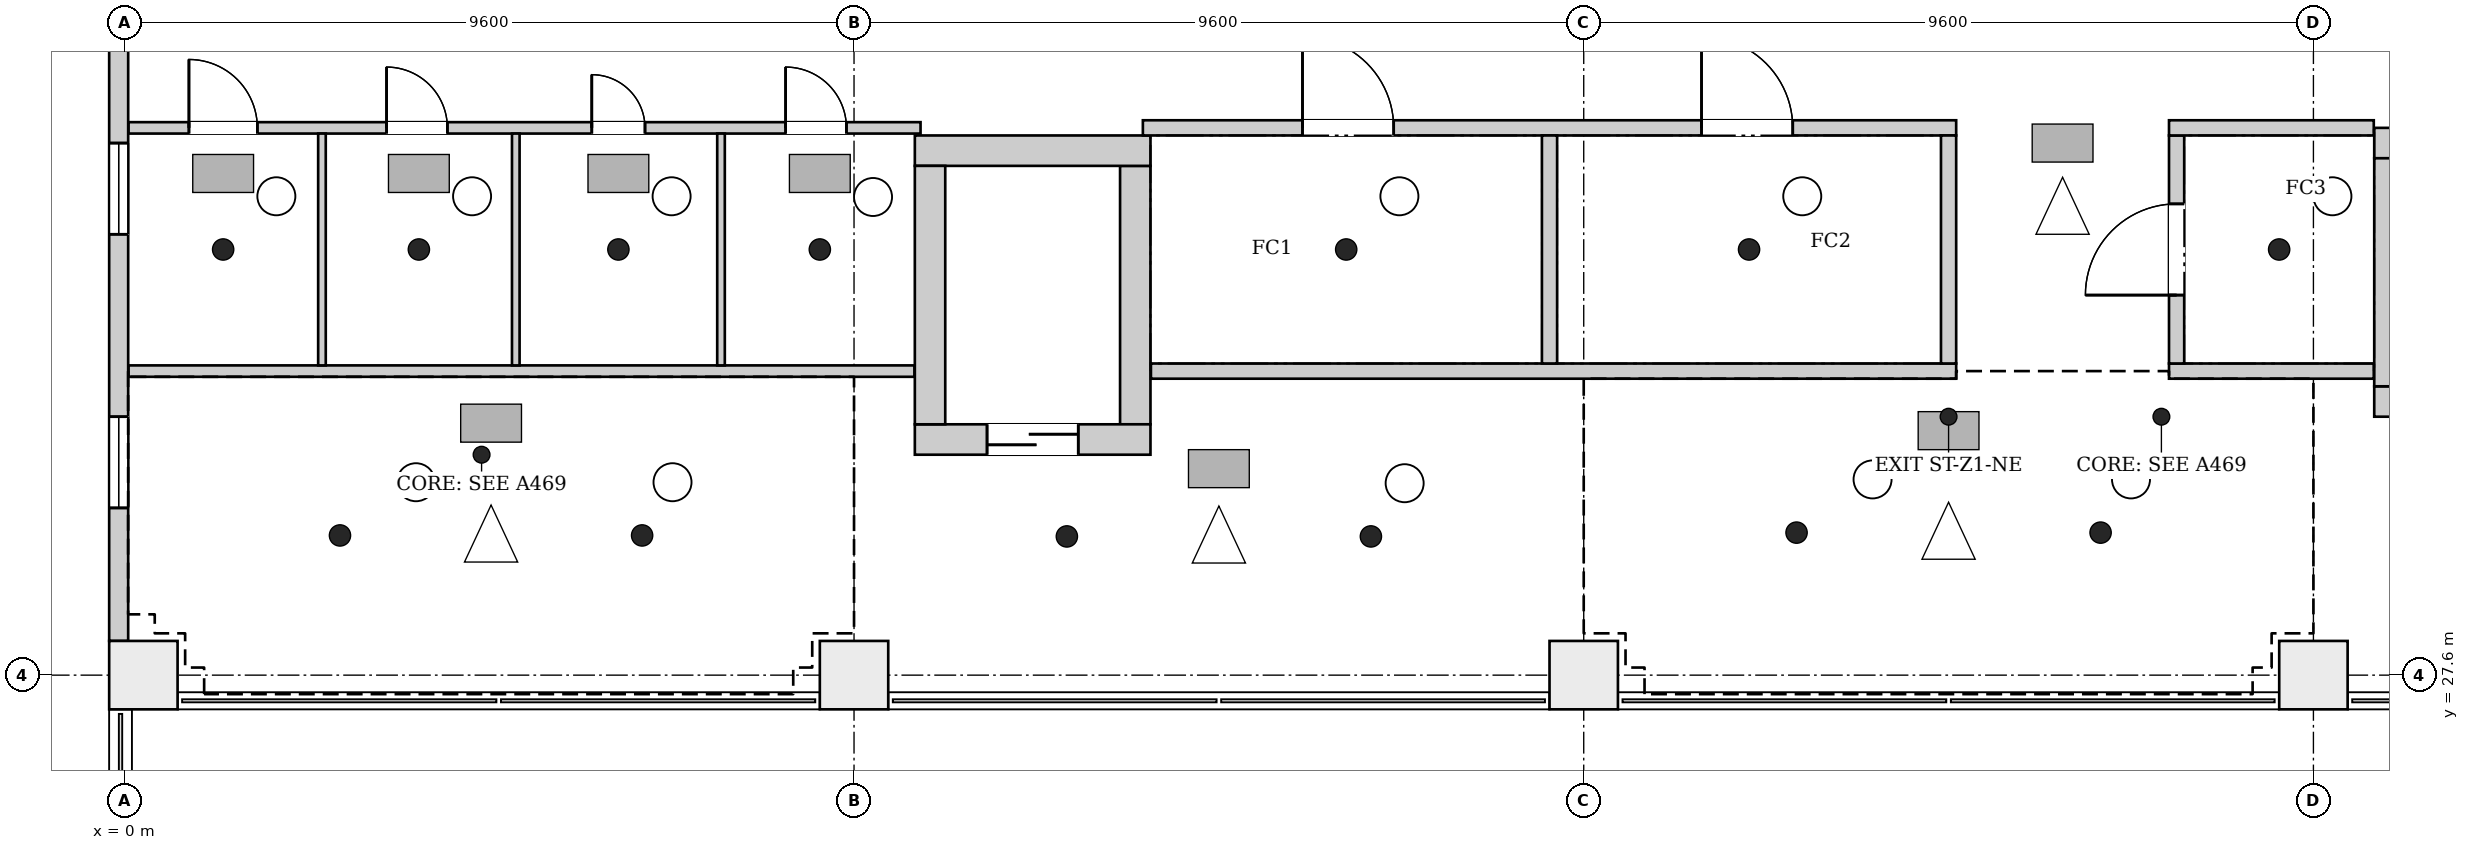
"""IFC4 building model, lengths in metres.
Left out: names, types, materials, properties, quantities, classifications, styles, units other than length and angle.
Written with IfcOpenShell. Run it as: python <this file> out.ifc"""

import sys

from ifc_helpers import new_model, si_unit, direction, frame, frame_2d, origin, origin_2d, place, context, subcontext, project, spatial, rectangle, extrude, element, fill, save


model = new_model("IFC4")
c1 = context("Model", 3, precision=1e-05, world=origin(), true_north=direction((0.0, 1.0)))
c2 = subcontext(c1, "Body", "Model", "MODEL_VIEW")
j1 = project(units=[si_unit("LENGTHUNIT", "METRE"), si_unit("PLANEANGLEUNIT", "RADIAN")], contexts=[c1])
p1 = place(None, origin())
s1 = spatial("IfcSite", under=j1, at=p1, CompositionType="ELEMENT")
p2 = place(p1, origin())
s2 = spatial("IfcBuilding", under=s1, at=p2, CompositionType="ELEMENT")
p3 = place(p2, frame((0.0, 0.0, 36.1)))
s3 = spatial("IfcBuildingStorey", under=s2, at=p3, CompositionType="ELEMENT", Elevation=36.1)
p4 = place(p3, frame((10.4, 30.7, 0.0), z_axis=(0.0, 0.0, 1.0), x_axis=(1.0, 0.0, 0.0)))
e1 = element("IfcWall", 1, at=p4, inside=s3, PredefinedType="SHEAR", context=c2, shape_type="SweptSolid", body=[
    extrude(rectangle(XDim=3.1, YDim=0.4, at=frame_2d((1.55, 0.0))), origin(), (0.0, 0.0, 1.0), 4.2),
])
p5 = place(p4, frame((0.95, 0.0, 0.0)))
e2 = element("IfcOpeningElement", 2, at=p5, cuts=e1, PredefinedType="OPENING", context=c2, shape_type="SweptSolid", body=[
    extrude(rectangle(XDim=1.2, YDim=2.1, at=frame_2d((0.6, 1.05))), frame((0.0, 0.21, 0.0), z_axis=(0.0, -1.0, 0.0), x_axis=(1.0, 0.0, 0.0)), (0.0, 0.0, 1.0), 0.42),
])
p6 = place(p3, frame((10.4, 34.5, 0.0), z_axis=(0.0, 0.0, 1.0), x_axis=(1.0, 0.0, 0.0)))
e3 = element("IfcWall", 3, at=p6, inside=s3, PredefinedType="SHEAR", context=c2, shape_type="SweptSolid", body=[
    extrude(rectangle(XDim=3.1, YDim=0.4, at=frame_2d((1.55, 0.0))), origin(), (0.0, 0.0, 1.0), 4.2),
])
for number, where, z_axis, x_axis in (
    (4, (10.6, 30.9, 0.0), (0.0, 0.0, 1.0), (0.0, 1.0, 0.0)),
    (5, (13.3, 30.9, 0.0), (0.0, 0.0, 1.0), (0.0, 1.0, 0.0)),
):
    element("IfcWall", number, at=place(p3, frame(where, z_axis=z_axis, x_axis=x_axis)), inside=s3, PredefinedType="SHEAR", context=c2, shape_type="SweptSolid", body=[
        extrude(rectangle(XDim=3.4, YDim=0.4, at=frame_2d((1.7, 0.0))), origin(), (0.0, 0.0, 1.0), 4.2),
    ])
p7 = place(p3, frame((29.6, 31.2, 0.0), z_axis=(0.0, 0.0, 1.0), x_axis=(1.0, 0.0, 0.0)))
e6 = element("IfcWall", 6, at=p7, inside=s3, PredefinedType="SHEAR", context=c2, shape_type="SweptSolid", body=[
    extrude(rectangle(XDim=2.9, YDim=0.4, at=frame_2d((1.45, 0.0))), origin(), (0.0, 0.0, 1.0), 4.2),
])
p8 = place(p7, frame((0.9, 0.0, 0.0)))
e7 = element("IfcOpeningElement", 7, at=p8, cuts=e6, PredefinedType="OPENING", context=c2, shape_type="SweptSolid", body=[
    extrude(rectangle(XDim=1.1, YDim=2.1, at=frame_2d((0.55, 1.05))), frame((0.0, 0.21, 0.0), z_axis=(0.0, -1.0, 0.0), x_axis=(1.0, 0.0, 0.0)), (0.0, 0.0, 1.0), 0.42),
])
p9 = place(p3, frame((29.6, 34.6, 0.0), z_axis=(0.0, 0.0, 1.0), x_axis=(1.0, 0.0, 0.0)))
e8 = element("IfcWall", 8, at=p9, inside=s3, PredefinedType="SHEAR", context=c2, shape_type="SweptSolid", body=[
    extrude(rectangle(XDim=2.9, YDim=0.4, at=frame_2d((1.45, 0.0))), origin(), (0.0, 0.0, 1.0), 4.2),
])
p10 = place(p3, frame((29.8, 31.4, 0.0), z_axis=(0.0, 0.0, 1.0), x_axis=(0.0, 1.0, 0.0)))
e9 = element("IfcWall", 9, at=p10, inside=s3, PredefinedType="SHEAR", context=c2, shape_type="SweptSolid", body=[
    extrude(rectangle(XDim=3.0, YDim=0.4, at=frame_2d((1.5, 0.0))), origin(), (0.0, 0.0, 1.0), 4.2),
])
for number, where, z_axis, x_axis in (
    (10, (0.25, 27.6, 0.0), (0.0, 0.0, 1.0), (1.0, 0.0, 0.0)),
    (11, (9.6, 27.6, 0.0), (0.0, 0.0, 1.0), (1.0, 0.0, 0.0)),
    (12, (19.2, 27.6, 0.0), (0.0, 0.0, 1.0), (1.0, 0.0, 0.0)),
    (13, (28.8, 27.6, 0.0), (0.0, 0.0, 1.0), (1.0, 0.0, 0.0)),
):
    element("IfcColumn", number, at=place(p3, frame(where, z_axis=z_axis, x_axis=x_axis)), inside=s3, PredefinedType="COLUMN", context=c2, shape_type="SweptSolid", body=[
        extrude(rectangle(XDim=0.9, YDim=0.9, at=origin_2d()), origin(), (0.0, 0.0, 1.0), 4.2),
    ])
p11 = place(p3, frame((-0.074, 36.35, 0.0), z_axis=(0.0, 0.0, 1.0), x_axis=(0.0, -1.0, 0.0)))
e14 = element("IfcWall", 14, at=p11, inside=s3, PredefinedType="ELEMENTEDWALL", context=c2, shape_type="SweptSolid", body=[
    extrude(rectangle(XDim=8.3, YDim=0.25, at=frame_2d((4.15, 0.0))), origin(), (0.0, 0.0, 1.0), 3.9),
])
p12 = place(p11, frame((5.35, 0.0, 0.9)))
e15 = element("IfcOpeningElement", 15, at=p12, cuts=e14, PredefinedType="OPENING", context=c2, shape_type="SweptSolid", body=[
    extrude(rectangle(XDim=1.2, YDim=2.6, at=frame_2d((0.6, 1.3))), frame((0.0, 0.135, 0.0), z_axis=(0.0, -1.0, 0.0), x_axis=(1.0, 0.0, 0.0)), (0.0, 0.0, 1.0), 0.27),
])
p13 = place(p11, frame((1.75, 0.0, 0.9)))
e16 = element("IfcOpeningElement", 16, at=p13, cuts=e14, PredefinedType="OPENING", context=c2, shape_type="SweptSolid", body=[
    extrude(rectangle(XDim=1.2, YDim=2.6, at=frame_2d((0.6, 1.3))), frame((0.0, 0.135, 0.0), z_axis=(0.0, -1.0, 0.0), x_axis=(1.0, 0.0, 0.0)), (0.0, 0.0, 1.0), 0.27),
])
p14 = place(p3, frame((0.056, 31.6, 0.0), z_axis=(0.0, 0.0, 1.0), x_axis=(1.0, 0.0, 0.0)))
e17 = element("IfcWall", 17, at=p14, inside=s3, PredefinedType="PARTITIONING", context=c2, shape_type="SweptSolid", body=[
    extrude(rectangle(XDim=10.338, YDim=0.15, at=frame_2d((5.169, 0.0))), origin(), (0.0, 0.0, 1.0), 3.9),
])
p15 = place(p3, frame((0.056, 34.8, 0.0), z_axis=(0.0, 0.0, 1.0), x_axis=(1.0, 0.0, 0.0)))
e18 = element("IfcWall", 18, at=p15, inside=s3, PredefinedType="PARTITIONING", context=c2, shape_type="SweptSolid", body=[
    extrude(rectangle(XDim=10.419, YDim=0.15, at=frame_2d((5.209, 0.0))), origin(), (0.0, 0.0, 1.0), 3.9),
])
p16 = place(p15, frame((0.794, 0.0, 0.0)))
e19 = element("IfcOpeningElement", 19, at=p16, cuts=e18, PredefinedType="OPENING", context=c2, shape_type="SweptSolid", body=[
    extrude(rectangle(XDim=0.9, YDim=2.1, at=frame_2d((0.45, 1.05))), frame((0.0, 0.085, 0.0), z_axis=(0.0, -1.0, 0.0), x_axis=(1.0, 0.0, 0.0)), (0.0, 0.0, 1.0), 0.17),
])
p17 = place(p15, frame((3.394, 0.0, 0.0)))
e20 = element("IfcOpeningElement", 20, at=p17, cuts=e18, PredefinedType="OPENING", context=c2, shape_type="SweptSolid", body=[
    extrude(rectangle(XDim=0.8, YDim=2.1, at=frame_2d((0.4, 1.05))), frame((0.0, 0.085, 0.0), z_axis=(0.0, -1.0, 0.0), x_axis=(1.0, 0.0, 0.0)), (0.0, 0.0, 1.0), 0.17),
])
p18 = place(p15, frame((6.094, 0.0, 0.0)))
e21 = element("IfcOpeningElement", 21, at=p18, cuts=e18, PredefinedType="OPENING", context=c2, shape_type="SweptSolid", body=[
    extrude(rectangle(XDim=0.7, YDim=2.1, at=frame_2d((0.35, 1.05))), frame((0.0, 0.085, 0.0), z_axis=(0.0, -1.0, 0.0), x_axis=(1.0, 0.0, 0.0)), (0.0, 0.0, 1.0), 0.17),
])
p19 = place(p15, frame((8.644, 0.0, 0.0)))
e22 = element("IfcOpeningElement", 22, at=p19, cuts=e18, PredefinedType="OPENING", context=c2, shape_type="SweptSolid", body=[
    extrude(rectangle(XDim=0.8, YDim=2.1, at=frame_2d((0.4, 1.05))), frame((0.0, 0.085, 0.0), z_axis=(0.0, -1.0, 0.0), x_axis=(1.0, 0.0, 0.0)), (0.0, 0.0, 1.0), 0.17),
])
for number, where, z_axis, x_axis in (
    (23, (2.6, 31.675, 0.0), (0.0, 0.0, 1.0), (0.0, 1.0, 0.0)),
    (24, (5.15, 31.675, 0.0), (0.0, 0.0, 1.0), (0.0, 1.0, 0.0)),
    (25, (7.85, 31.675, 0.0), (0.0, 0.0, 1.0), (0.0, 1.0, 0.0)),
):
    element("IfcWall", number, at=place(p3, frame(where, z_axis=z_axis, x_axis=x_axis)), inside=s3, PredefinedType="PARTITIONING", context=c2, shape_type="SweptSolid", body=[
        extrude(rectangle(XDim=3.05, YDim=0.1, at=frame_2d((1.525, 0.0))), origin(), (0.0, 0.0, 1.0), 3.9),
    ])
p20 = place(p3, frame((13.4, 34.8, 0.0), z_axis=(0.0, 0.0, 1.0), x_axis=(1.0, 0.0, 0.0)))
e26 = element("IfcWall", 26, at=p20, inside=s3, PredefinedType="PARTITIONING", context=c2, shape_type="SweptSolid", body=[
    extrude(rectangle(XDim=10.7, YDim=0.2, at=frame_2d((5.35, 0.0))), origin(), (0.0, 0.0, 1.0), 3.9),
])
p21 = place(p20, frame((2.1, 0.0, 0.0)))
e27 = element("IfcOpeningElement", 27, at=p21, cuts=e26, PredefinedType="OPENING", context=c2, shape_type="SweptSolid", body=[
    extrude(rectangle(XDim=1.2, YDim=2.1, at=frame_2d((0.6, 1.05))), frame((0.0, 0.11, 0.0), z_axis=(0.0, -1.0, 0.0), x_axis=(1.0, 0.0, 0.0)), (0.0, 0.0, 1.0), 0.22),
])
p22 = place(p20, frame((7.35, 0.0, 0.0)))
e28 = element("IfcOpeningElement", 28, at=p22, cuts=e26, PredefinedType="OPENING", context=c2, shape_type="SweptSolid", body=[
    extrude(rectangle(XDim=1.2, YDim=2.1, at=frame_2d((0.6, 1.05))), frame((0.0, 0.11, 0.0), z_axis=(0.0, -1.0, 0.0), x_axis=(1.0, 0.0, 0.0)), (0.0, 0.0, 1.0), 0.22),
])
p23 = place(p3, frame((13.506, 31.6, 0.0), z_axis=(0.0, 0.0, 1.0), x_axis=(1.0, 0.0, 0.0)))
e29 = element("IfcWall", 29, at=p23, inside=s3, PredefinedType="PARTITIONING", context=c2, shape_type="SweptSolid", body=[
    extrude(rectangle(XDim=10.594, YDim=0.2, at=frame_2d((5.297, 0.0))), origin(), (0.0, 0.0, 1.0), 3.9),
])
for number, where, z_axis, x_axis in (
    (30, (18.75, 31.7, 0.0), (0.0, 0.0, 1.0), (0.0, 1.0, 0.0)),
    (31, (24.0, 31.7, 0.0), (0.0, 0.0, 1.0), (0.0, 1.0, 0.0)),
):
    element("IfcWall", number, at=place(p3, frame(where, z_axis=z_axis, x_axis=x_axis)), inside=s3, PredefinedType="PARTITIONING", context=c2, shape_type="SweptSolid", body=[
        extrude(rectangle(XDim=3.0, YDim=0.2, at=frame_2d((1.5, 0.0))), origin(), (0.0, 0.0, 1.0), 3.9),
    ])
p24 = place(p3, frame((26.9, 31.6, 0.0), z_axis=(0.0, 0.0, 1.0), x_axis=(1.0, 0.0, 0.0)))
e32 = element("IfcWall", 32, at=p24, inside=s3, PredefinedType="PARTITIONING", context=c2, shape_type="SweptSolid", body=[
    extrude(rectangle(XDim=2.694, YDim=0.2, at=frame_2d((1.347, 0.0))), origin(), (0.0, 0.0, 1.0), 3.9),
])
p25 = place(p3, frame((27.0, 31.7, 0.0), z_axis=(0.0, 0.0, 1.0), x_axis=(0.0, 1.0, 0.0)))
e33 = element("IfcWall", 33, at=p25, inside=s3, PredefinedType="PARTITIONING", context=c2, shape_type="SweptSolid", body=[
    extrude(rectangle(XDim=3.0, YDim=0.2, at=frame_2d((1.5, 0.0))), origin(), (0.0, 0.0, 1.0), 3.9),
])
p26 = place(p25, frame((0.9, 0.0, 0.0)))
e34 = element("IfcOpeningElement", 34, at=p26, cuts=e33, PredefinedType="OPENING", context=c2, shape_type="SweptSolid", body=[
    extrude(rectangle(XDim=1.2, YDim=2.1, at=frame_2d((0.6, 1.05))), frame((0.0, 0.11, 0.0), z_axis=(0.0, -1.0, 0.0), x_axis=(1.0, 0.0, 0.0)), (0.0, 0.0, 1.0), 0.22),
])
p27 = place(p3, frame((26.9, 34.8, 0.0), z_axis=(0.0, 0.0, 1.0), x_axis=(1.0, 0.0, 0.0)))
e35 = element("IfcWall", 35, at=p27, inside=s3, PredefinedType="PARTITIONING", context=c2, shape_type="SweptSolid", body=[
    extrude(rectangle(XDim=2.694, YDim=0.2, at=frame_2d((1.347, 0.0))), origin(), (0.0, 0.0, 1.0), 3.9),
])
p28 = place(p12, origin())
e36 = element("IfcWindow", 36, at=p28, inside=s3, PartitioningType="SINGLE_PANEL", PredefinedType="WINDOW", context=c2, shape_type="SweptSolid", body=[
    extrude(rectangle(XDim=1.2, YDim=2.6, at=frame_2d((0.6, 1.3))), frame((0.0, 0.03, 0.0), z_axis=(0.0, -1.0, 0.0), x_axis=(1.0, 0.0, 0.0)), (0.0, 0.0, 1.0), 0.06),
])
fill(e15, e36)
p29 = place(p13, origin())
e37 = element("IfcWindow", 37, at=p29, inside=s3, PartitioningType="SINGLE_PANEL", PredefinedType="WINDOW", context=c2, shape_type="SweptSolid", body=[
    extrude(rectangle(XDim=1.2, YDim=2.6, at=frame_2d((0.6, 1.3))), frame((0.0, 0.03, 0.0), z_axis=(0.0, -1.0, 0.0), x_axis=(1.0, 0.0, 0.0)), (0.0, 0.0, 1.0), 0.06),
])
fill(e16, e37)
p30 = place(p5, origin())
e38 = element("IfcDoor", 38, at=p30, inside=s3, OperationType="DOUBLE_DOOR_SLIDING", PredefinedType="DOOR", context=c2, shape_type="SweptSolid", body=[
    extrude(rectangle(XDim=1.2, YDim=2.1, at=frame_2d((0.6, 1.05))), frame((0.0, 0.025, 0.0), z_axis=(0.0, -1.0, 0.0), x_axis=(1.0, 0.0, 0.0)), (0.0, 0.0, 1.0), 0.05),
])
fill(e2, e38)
p31 = place(p16, origin())
e39 = element("IfcDoor", 39, at=p31, inside=s3, OperationType="SINGLE_SWING_LEFT", PredefinedType="DOOR", context=c2, shape_type="SweptSolid", body=[
    extrude(rectangle(XDim=0.9, YDim=2.1, at=frame_2d((0.45, 1.05))), frame((0.0, 0.025, 0.0), z_axis=(0.0, -1.0, 0.0), x_axis=(1.0, 0.0, 0.0)), (0.0, 0.0, 1.0), 0.05),
])
fill(e19, e39)
p32 = place(p17, origin())
e40 = element("IfcDoor", 40, at=p32, inside=s3, OperationType="SINGLE_SWING_LEFT", PredefinedType="DOOR", context=c2, shape_type="SweptSolid", body=[
    extrude(rectangle(XDim=0.8, YDim=2.1, at=frame_2d((0.4, 1.05))), frame((0.0, 0.025, 0.0), z_axis=(0.0, -1.0, 0.0), x_axis=(1.0, 0.0, 0.0)), (0.0, 0.0, 1.0), 0.05),
])
fill(e20, e40)
p33 = place(p18, origin())
e41 = element("IfcDoor", 41, at=p33, inside=s3, OperationType="SINGLE_SWING_LEFT", PredefinedType="DOOR", context=c2, shape_type="SweptSolid", body=[
    extrude(rectangle(XDim=0.7, YDim=2.1, at=frame_2d((0.35, 1.05))), frame((0.0, 0.025, 0.0), z_axis=(0.0, -1.0, 0.0), x_axis=(1.0, 0.0, 0.0)), (0.0, 0.0, 1.0), 0.05),
])
fill(e21, e41)
p34 = place(p19, origin())
e42 = element("IfcDoor", 42, at=p34, inside=s3, OperationType="SINGLE_SWING_LEFT", PredefinedType="DOOR", context=c2, shape_type="SweptSolid", body=[
    extrude(rectangle(XDim=0.8, YDim=2.1, at=frame_2d((0.4, 1.05))), frame((0.0, 0.025, 0.0), z_axis=(0.0, -1.0, 0.0), x_axis=(1.0, 0.0, 0.0)), (0.0, 0.0, 1.0), 0.05),
])
fill(e22, e42)
p35 = place(p21, origin())
e43 = element("IfcDoor", 43, at=p35, inside=s3, OperationType="SINGLE_SWING_RIGHT", PredefinedType="DOOR", context=c2, shape_type="SweptSolid", body=[
    extrude(rectangle(XDim=1.2, YDim=2.1, at=frame_2d((0.6, 1.05))), frame((0.0, 0.025, 0.0), z_axis=(0.0, -1.0, 0.0), x_axis=(1.0, 0.0, 0.0)), (0.0, 0.0, 1.0), 0.05),
])
fill(e27, e43)
p36 = place(p22, origin())
e44 = element("IfcDoor", 44, at=p36, inside=s3, OperationType="SINGLE_SWING_LEFT", PredefinedType="DOOR", context=c2, shape_type="SweptSolid", body=[
    extrude(rectangle(XDim=1.2, YDim=2.1, at=frame_2d((0.6, 1.05))), frame((0.0, 0.025, 0.0), z_axis=(0.0, -1.0, 0.0), x_axis=(1.0, 0.0, 0.0)), (0.0, 0.0, 1.0), 0.05),
])
fill(e28, e44)
p37 = place(p26, origin())
e45 = element("IfcDoor", 45, at=p37, inside=s3, OperationType="SINGLE_SWING_RIGHT", PredefinedType="DOOR", context=c2, shape_type="SweptSolid", body=[
    extrude(rectangle(XDim=1.2, YDim=2.1, at=frame_2d((0.6, 1.05))), frame((0.0, 0.025, 0.0), z_axis=(0.0, -1.0, 0.0), x_axis=(1.0, 0.0, 0.0)), (0.0, 0.0, 1.0), 0.05),
])
fill(e34, e45)
save(model, sys.argv[1])
